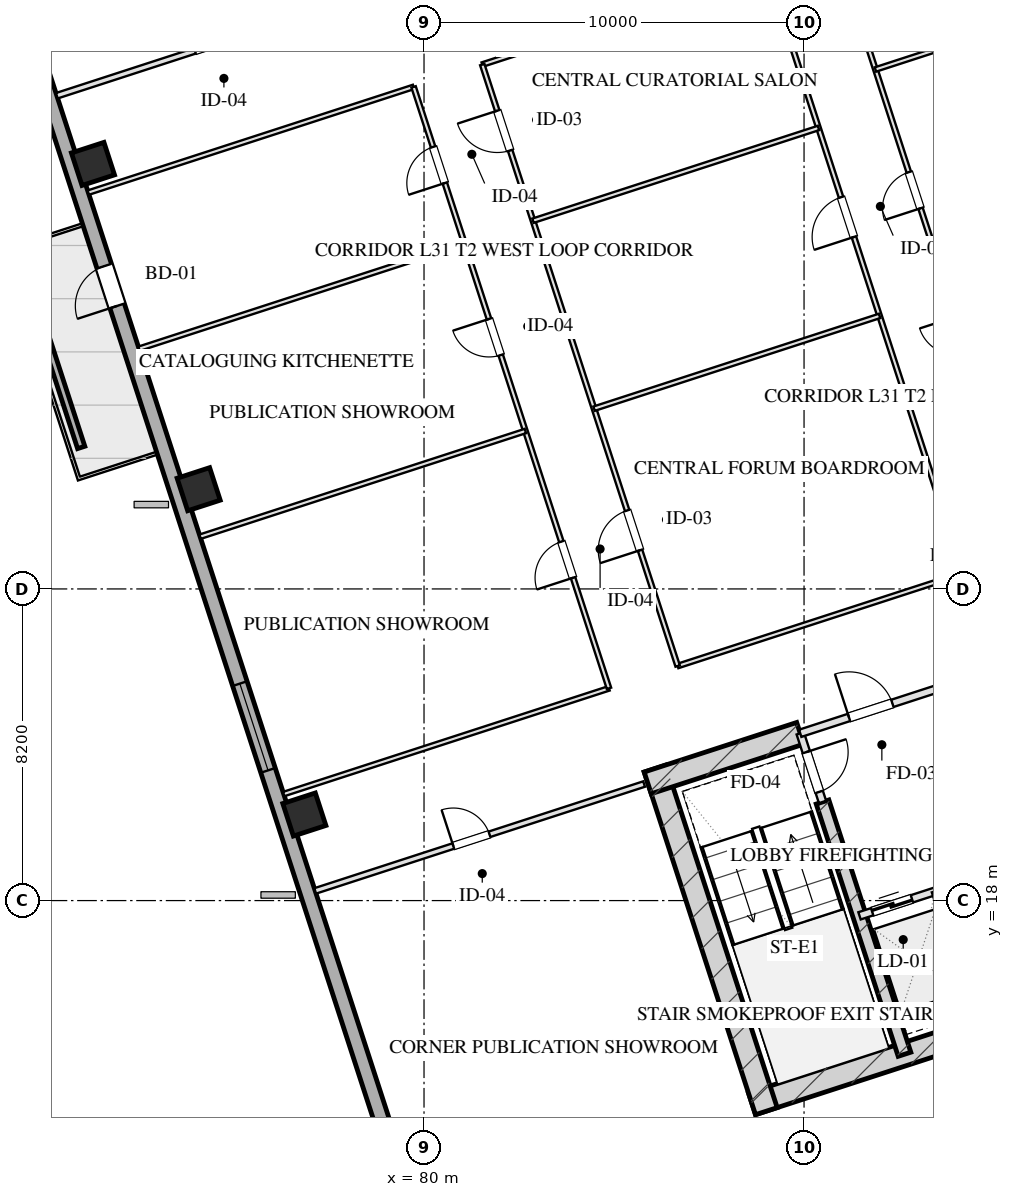
"""IFC4 building model, lengths in metres.
Left out: names, types, materials, properties, quantities, classifications, styles, units other than length and angle.
Written with IfcOpenShell. Run it as: python <this file> out.ifc"""

import sys

from ifc_helpers import new_model, si_unit, direction, frame, frame_2d, origin, origin_2d, place, context, subcontext, project, spatial, rectangle, hollow_rectangle, extrude, element, fill, save


model = new_model("IFC4")
c1 = context("Model", 3, precision=1e-05, world=origin(), true_north=direction((0.0, 1.0)))
c2 = subcontext(c1, "Body", "Model", "MODEL_VIEW")
j1 = project(units=[si_unit("LENGTHUNIT", "METRE"), si_unit("PLANEANGLEUNIT", "RADIAN")], contexts=[c1])
p1 = place(None, origin())
s1 = spatial("IfcSite", under=j1, at=p1, CompositionType="ELEMENT")
p2 = place(p1, origin())
s2 = spatial("IfcBuilding", under=s1, at=p2, CompositionType="ELEMENT")
p3 = place(p2, frame((0.0, 0.0, 120.75)))
s3 = spatial("IfcBuildingStorey", under=s2, at=p3, CompositionType="ELEMENT", Elevation=120.75)
p4 = place(p3, frame((88.63, 12.652, 0.0), z_axis=(0.0, 0.0, 1.0), x_axis=(0.95105714907, 0.309015046886, 0.0)))
e1 = element("IfcWall", 1, at=p4, inside=s3, PredefinedType="SHEAR", context=c2, shape_type="SweptSolid", body=[
    extrude(rectangle(XDim=16.4, YDim=0.6, at=frame_2d((8.2, 0.0))), origin(), (0.0, 0.0, 1.0), 3.45),
])
p5 = place(p3, frame((86.078, 21.475, 0.0), z_axis=(0.0, 0.0, 1.0), x_axis=(0.309017938678, -0.951056209472, 0.0)))
e2 = element("IfcWall", 2, at=p5, inside=s3, PredefinedType="SHEAR", context=c2, shape_type="SweptSolid", body=[
    extrude(rectangle(XDim=9.48, YDim=0.6, at=frame_2d((4.74, 0.0))), origin(), (0.0, 0.0, 1.0), 3.45),
])
p6 = place(p3, frame((90.486, 20.594, 0.0), z_axis=(0.0, 0.0, 1.0), x_axis=(0.309020428229, -0.951055400562, 0.0)))
e3 = element("IfcWall", 3, at=p6, inside=s3, PredefinedType="SHEAR", context=c2, shape_type="SweptSolid", body=[
    extrude(rectangle(XDim=6.98, YDim=0.35, at=frame_2d((3.49, 0.0))), origin(), (0.0, 0.0, 1.0), 3.45),
])
p7 = place(p3, frame((85.886, 21.097, 0.0), z_axis=(0.0, 0.0, 1.0), x_axis=(0.951068073652, 0.308981422225, 0.0)))
e4 = element("IfcWall", 4, at=p7, inside=s3, PredefinedType="SHEAR", context=c2, shape_type="SweptSolid", body=[
    extrude(rectangle(XDim=4.22, YDim=0.6, at=frame_2d((2.11, 0.0))), origin(), (0.0, 0.0, 1.0), 3.45),
])
for number, where, z_axis, x_axis in (
    (5, (76.851, 20.264, 0.0), (0.0, 0.0, 1.0), (0.951, 0.309, 0.0)),
    (6, (74.07, 28.824, 0.0), (0.0, 0.0, 1.0), (0.951, 0.309, 0.0)),
    (7, (71.289, 37.384, 0.0), (0.0, 0.0, 1.0), (0.951, 0.309, 0.0)),
):
    element("IfcColumn", number, at=place(p3, frame(where, z_axis=z_axis, x_axis=x_axis)), inside=s3, PredefinedType="COLUMN", context=c2, shape_type="SweptSolid", body=[
        extrude(hollow_rectangle(XDim=0.9, YDim=0.9, WallThickness=0.032, at=origin_2d()), origin(), (0.0, 0.0, 1.0), 3.451),
    ])
p8 = place(p3, frame((80.716, 6.59, 0.0), z_axis=(0.0, 0.0, 1.0), x_axis=(-0.309017542002, 0.95105633836, 0.0)))
e8 = element("IfcWall", 8, at=p8, inside=s3, PredefinedType="SOLIDWALL", context=c2, shape_type="SweptSolid", body=[
    extrude(rectangle(XDim=46.4, YDim=0.4, at=frame_2d((23.2, 0.0))), origin(), (0.0, 0.0, 1.0), 2.61),
])
p9 = place(p8, frame((15.6, 0.0, 0.75)))
e9 = element("IfcOpeningElement", 9, at=p9, cuts=e8, PredefinedType="OPENING", context=c2, shape_type="SweptSolid", body=[
    extrude(rectangle(XDim=2.4, YDim=1.46, at=frame_2d((1.2, 0.73))), frame((0.0, 0.21, 0.0), z_axis=(0.0, -1.0, 0.0), x_axis=(1.0, 0.0, 0.0)), (0.0, 0.0, 1.0), 0.42),
])
p10 = place(p8, frame((28.45, 0.0, 0.0)))
e10 = element("IfcOpeningElement", 10, at=p10, cuts=e8, PredefinedType="OPENING", context=c2, shape_type="SweptSolid", body=[
    extrude(rectangle(XDim=1.1, YDim=2.15, at=frame_2d((0.55, 1.075))), frame((0.0, 0.21, 0.0), z_axis=(0.0, -1.0, 0.0), x_axis=(1.0, 0.0, 0.0)), (0.0, 0.0, 1.0), 0.42),
])
p11 = place(p3, frame((111.953, 14.005, 0.0), z_axis=(0.0, 0.0, 1.0), x_axis=(-0.95105505922, -0.309021478754, 0.0)))
e11 = element("IfcWall", 11, at=p11, inside=s3, PredefinedType="SOLIDWALL", context=c2, shape_type="SweptSolid", body=[
    extrude(rectangle(XDim=29.4, YDim=0.4, at=frame_2d((14.7, 0.0))), origin(), (0.0, 0.0, 1.0), 2.61),
])
p12 = place(p3, frame((70.979, 29.923, 0.0), z_axis=(0.0, 0.0, 1.0), x_axis=(-0.308986014439, 0.951066581729, 0.0)))
e12 = element("IfcWall", 12, at=p12, inside=s3, PredefinedType="PARAPET", context=c2, shape_type="SweptSolid", body=[
    extrude(rectangle(XDim=4.8, YDim=0.2, at=frame_2d((2.4, 0.0))), origin(), (0.0, 0.0, 1.0), 0.75),
])
p13 = place(p3, frame((89.899, 22.401, 0.0), z_axis=(0.0, 0.0, 1.0), x_axis=(0.308932062672, -0.951084108086, 0.0)))
e13 = element("IfcWall", 13, at=p13, inside=s3, PredefinedType="PARTITIONING", context=c2, shape_type="SweptSolid", body=[
    extrude(rectangle(XDim=1.9, YDim=0.2, at=frame_2d((0.95, 0.0))), origin(), (0.0, 0.0, 1.0), 3.175),
])
p14 = place(p13, frame((0.52, 0.0, 0.0)))
e14 = element("IfcOpeningElement", 14, at=p14, cuts=e13, PredefinedType="OPENING", context=c2, shape_type="SweptSolid", body=[
    extrude(rectangle(XDim=1.1, YDim=2.05, at=frame_2d((0.55, 1.025))), frame((0.0, 0.11, 0.0), z_axis=(0.0, -1.0, 0.0), x_axis=(1.0, 0.0, 0.0)), (0.0, 0.0, 1.0), 0.22),
])
p15 = place(p3, frame((89.899, 22.401, 0.0), z_axis=(0.0, 0.0, 1.0), x_axis=(0.951046716504, 0.309047153403, 0.0)))
e15 = element("IfcWall", 15, at=p15, inside=s3, PredefinedType="PARTITIONING", context=c2, shape_type="SweptSolid", body=[
    extrude(rectangle(XDim=3.83, YDim=0.2, at=frame_2d((1.915, 0.0))), origin(), (0.0, 0.0, 1.0), 3.175),
])
p16 = place(p15, frame((1.35, 0.0, 0.0)))
e16 = element("IfcOpeningElement", 16, at=p16, cuts=e15, PredefinedType="OPENING", context=c2, shape_type="SweptSolid", body=[
    extrude(rectangle(XDim=1.2, YDim=2.05, at=frame_2d((0.6, 1.025))), frame((0.0, 0.11, 0.0), z_axis=(0.0, -1.0, 0.0), x_axis=(1.0, 0.0, 0.0)), (0.0, 0.0, 1.0), 0.22),
])
p17 = place(p3, frame((91.46, 17.598, 0.0), z_axis=(0.0, 0.0, 1.0), x_axis=(0.951062257173, 0.308999325213, 0.0)))
e17 = element("IfcWall", 17, at=p17, inside=s3, PredefinedType="PARTITIONING", context=c2, shape_type="SweptSolid", body=[
    extrude(rectangle(XDim=2.1, YDim=0.2, at=frame_2d((1.05, 0.0))), origin(), (0.0, 0.0, 1.0), 3.175),
])
p18 = place(p17, frame((0.35, 0.0, 0.0)))
e18 = element("IfcOpeningElement", 18, at=p18, cuts=e17, PredefinedType="OPENING", context=c2, shape_type="SweptSolid", body=[
    extrude(rectangle(XDim=1.1, YDim=2.05, at=frame_2d((0.55, 1.025))), frame((0.0, 0.11, 0.0), z_axis=(0.0, -1.0, 0.0), x_axis=(1.0, 0.0, 0.0)), (0.0, 0.0, 1.0), 0.22),
])
p19 = place(p3, frame((93.457, 18.247, 0.0), z_axis=(0.0, 0.0, 1.0), x_axis=(0.3089935693, -0.951064127245, 0.0)))
e19 = element("IfcWall", 19, at=p19, inside=s3, PredefinedType="PARTITIONING", context=c2, shape_type="SweptSolid", body=[
    extrude(rectangle(XDim=3.7, YDim=0.2, at=frame_2d((1.85, 0.0))), origin(), (0.0, 0.0, 1.0), 3.175),
])
p20 = place(p3, frame((77.136, 18.254, 0.0), z_axis=(0.0, 0.0, 1.0), x_axis=(0.951057133767, 0.309015093986, 0.0)))
e20 = element("IfcWall", 20, at=p20, inside=s3, PredefinedType="PARTITIONING", context=c2, shape_type="SweptSolid", body=[
    extrude(rectangle(XDim=9.1, YDim=0.15, at=frame_2d((4.55, 0.0))), origin(), (0.0, 0.0, 1.0), 3.175),
])
p21 = place(p20, frame((3.822, 0.0, 0.0)))
e21 = element("IfcOpeningElement", 21, at=p21, cuts=e20, PredefinedType="OPENING", context=c2, shape_type="SweptSolid", body=[
    extrude(rectangle(XDim=1.0, YDim=2.05, at=frame_2d((0.5, 1.025))), frame((0.0, 0.085, 0.0), z_axis=(0.0, -1.0, 0.0), x_axis=(1.0, 0.0, 0.0)), (0.0, 0.0, 1.0), 0.17),
])
p22 = place(p3, frame((70.338, 39.177, 0.0), z_axis=(0.0, 0.0, 1.0), x_axis=(0.951059695568, 0.309007209409, 0.0)))
e22 = element("IfcWall", 22, at=p22, inside=s3, PredefinedType="PARTITIONING", context=c2, shape_type="SweptSolid", body=[
    extrude(rectangle(XDim=9.1, YDim=0.15, at=frame_2d((4.55, 0.0))), origin(), (0.0, 0.0, 1.0), 3.175),
])
p23 = place(p22, frame((3.822, 0.0, 0.0)))
e23 = element("IfcOpeningElement", 23, at=p23, cuts=e22, PredefinedType="OPENING", context=c2, shape_type="SweptSolid", body=[
    extrude(rectangle(XDim=1.0, YDim=2.05, at=frame_2d((0.5, 1.025))), frame((0.0, 0.085, 0.0), z_axis=(0.0, -1.0, 0.0), x_axis=(1.0, 0.0, 0.0)), (0.0, 0.0, 1.0), 0.17),
])
p24 = place(p3, frame((76.308, 20.803, 0.0), z_axis=(0.0, 0.0, 1.0), x_axis=(0.951054001411, 0.309024734286, 0.0)))
e24 = element("IfcWall", 24, at=p24, inside=s3, PredefinedType="PARTITIONING", context=c2, shape_type="SweptSolid", body=[
    extrude(rectangle(XDim=9.0, YDim=0.12, at=frame_2d((4.5, 0.0))), origin(), (0.0, 0.0, 1.0), 3.175),
])
p25 = place(p3, frame((86.675, 24.171, 0.0), z_axis=(0.0, 0.0, 1.0), x_axis=(0.951057231385, 0.309014793547, 0.0)))
e25 = element("IfcWall", 25, at=p25, inside=s3, PredefinedType="PARTITIONING", context=c2, shape_type="SweptSolid", body=[
    extrude(rectangle(XDim=7.9, YDim=0.12, at=frame_2d((3.95, 0.0))), origin(), (0.0, 0.0, 1.0), 3.175),
])
p26 = place(p3, frame((71.166, 36.629, 0.0), z_axis=(0.0, 0.0, 1.0), x_axis=(0.951059383421, 0.309008170129, 0.0)))
e26 = element("IfcWall", 26, at=p26, inside=s3, PredefinedType="PARTITIONING", context=c2, shape_type="SweptSolid", body=[
    extrude(rectangle(XDim=9.0, YDim=0.12, at=frame_2d((4.5, 0.0))), origin(), (0.0, 0.0, 1.0), 3.175),
])
p27 = place(p3, frame((81.532, 39.997, 0.0), z_axis=(0.0, 0.0, 1.0), x_axis=(0.951048148493, 0.309042746635, 0.0)))
e27 = element("IfcWall", 27, at=p27, inside=s3, PredefinedType="PARTITIONING", context=c2, shape_type="SweptSolid", body=[
    extrude(rectangle(XDim=7.9, YDim=0.12, at=frame_2d((3.95, 0.0))), origin(), (0.0, 0.0, 1.0), 3.175),
])
p28 = place(p3, frame((84.867, 23.584, 0.0), z_axis=(0.0, 0.0, 1.0), x_axis=(-0.309022042254, 0.951054876125, 0.0)))
e28 = element("IfcWall", 28, at=p28, inside=s3, PredefinedType="PARTITIONING", context=c2, shape_type="SweptSolid", body=[
    extrude(rectangle(XDim=16.64, YDim=0.12, at=frame_2d((8.32, 0.0))), origin(), (0.0, 0.0, 1.0), 3.175),
])
p29 = place(p28, frame((3.06, 0.0, 0.0)))
e29 = element("IfcOpeningElement", 29, at=p29, cuts=e28, PredefinedType="OPENING", context=c2, shape_type="SweptSolid", body=[
    extrude(rectangle(XDim=1.0, YDim=2.05, at=frame_2d((0.5, 1.025))), frame((0.0, 0.07, 0.0), z_axis=(0.0, -1.0, 0.0), x_axis=(1.0, 0.0, 0.0)), (0.0, 0.0, 1.0), 0.14),
])
p30 = place(p28, frame((9.22, 0.0, 0.0)))
e30 = element("IfcOpeningElement", 30, at=p30, cuts=e28, PredefinedType="OPENING", context=c2, shape_type="SweptSolid", body=[
    extrude(rectangle(XDim=1.0, YDim=2.05, at=frame_2d((0.5, 1.025))), frame((0.0, 0.07, 0.0), z_axis=(0.0, -1.0, 0.0), x_axis=(1.0, 0.0, 0.0)), (0.0, 0.0, 1.0), 0.14),
])
p31 = place(p28, frame((13.98, 0.0, 0.0)))
e31 = element("IfcOpeningElement", 31, at=p31, cuts=e28, PredefinedType="OPENING", context=c2, shape_type="SweptSolid", body=[
    extrude(rectangle(XDim=1.0, YDim=2.05, at=frame_2d((0.5, 1.025))), frame((0.0, 0.07, 0.0), z_axis=(0.0, -1.0, 0.0), x_axis=(1.0, 0.0, 0.0)), (0.0, 0.0, 1.0), 0.14),
])
p32 = place(p3, frame((86.675, 24.171, 0.0), z_axis=(0.0, 0.0, 1.0), x_axis=(-0.309022042254, 0.951054876125, 0.0)))
e32 = element("IfcWall", 32, at=p32, inside=s3, PredefinedType="PARTITIONING", context=c2, shape_type="SweptSolid", body=[
    extrude(rectangle(XDim=16.64, YDim=0.12, at=frame_2d((8.32, 0.0))), origin(), (0.0, 0.0, 1.0), 3.175),
])
p33 = place(p32, frame((3.204, 0.0, 0.0)))
e33 = element("IfcOpeningElement", 33, at=p33, cuts=e32, PredefinedType="OPENING", context=c2, shape_type="SweptSolid", body=[
    extrude(rectangle(XDim=1.1, YDim=2.05, at=frame_2d((0.55, 1.025))), frame((0.0, 0.07, 0.0), z_axis=(0.0, -1.0, 0.0), x_axis=(1.0, 0.0, 0.0)), (0.0, 0.0, 1.0), 0.14),
])
p34 = place(p32, frame((14.264, 0.0, 0.0)))
e34 = element("IfcOpeningElement", 34, at=p34, cuts=e32, PredefinedType="OPENING", context=c2, shape_type="SweptSolid", body=[
    extrude(rectangle(XDim=1.1, YDim=2.05, at=frame_2d((0.55, 1.025))), frame((0.0, 0.07, 0.0), z_axis=(0.0, -1.0, 0.0), x_axis=(1.0, 0.0, 0.0)), (0.0, 0.0, 1.0), 0.14),
])
p35 = place(p3, frame((94.188, 26.613, 0.0), z_axis=(0.0, 0.0, 1.0), x_axis=(-0.30901773025, 0.951056277195, 0.0)))
e35 = element("IfcWall", 35, at=p35, inside=s3, PredefinedType="PARTITIONING", context=c2, shape_type="SweptSolid", body=[
    extrude(rectangle(XDim=16.64, YDim=0.12, at=frame_2d((8.32, 0.0))), origin(), (0.0, 0.0, 1.0), 3.175),
])
p36 = place(p35, frame((9.304, 0.0, 0.0)))
e36 = element("IfcOpeningElement", 36, at=p36, cuts=e35, PredefinedType="OPENING", context=c2, shape_type="SweptSolid", body=[
    extrude(rectangle(XDim=1.1, YDim=2.05, at=frame_2d((0.55, 1.025))), frame((0.0, 0.07, 0.0), z_axis=(0.0, -1.0, 0.0), x_axis=(1.0, 0.0, 0.0)), (0.0, 0.0, 1.0), 0.14),
])
p37 = place(p3, frame((95.995, 27.2, 0.0), z_axis=(0.0, 0.0, 1.0), x_axis=(-0.309022042254, 0.951054876125, 0.0)))
e37 = element("IfcWall", 37, at=p37, inside=s3, PredefinedType="PARTITIONING", context=c2, shape_type="SweptSolid", body=[
    extrude(rectangle(XDim=16.64, YDim=0.12, at=frame_2d((8.32, 0.0))), origin(), (0.0, 0.0, 1.0), 3.175),
])
p38 = place(p37, frame((1.16, 0.0, 0.0)))
e38 = element("IfcOpeningElement", 38, at=p38, cuts=e37, PredefinedType="OPENING", context=c2, shape_type="SweptSolid", body=[
    extrude(rectangle(XDim=1.0, YDim=2.05, at=frame_2d((0.5, 1.025))), frame((0.0, 0.07, 0.0), z_axis=(0.0, -1.0, 0.0), x_axis=(1.0, 0.0, 0.0)), (0.0, 0.0, 1.0), 0.14),
])
p39 = place(p37, frame((5.48, 0.0, 0.0)))
e39 = element("IfcOpeningElement", 39, at=p39, cuts=e37, PredefinedType="OPENING", context=c2, shape_type="SweptSolid", body=[
    extrude(rectangle(XDim=1.0, YDim=2.05, at=frame_2d((0.5, 1.025))), frame((0.0, 0.07, 0.0), z_axis=(0.0, -1.0, 0.0), x_axis=(1.0, 0.0, 0.0)), (0.0, 0.0, 1.0), 0.14),
])
p40 = place(p37, frame((9.48, 0.0, 0.0)))
e40 = element("IfcOpeningElement", 40, at=p40, cuts=e37, PredefinedType="OPENING", context=c2, shape_type="SweptSolid", body=[
    extrude(rectangle(XDim=1.0, YDim=2.05, at=frame_2d((0.5, 1.025))), frame((0.0, 0.07, 0.0), z_axis=(0.0, -1.0, 0.0), x_axis=(1.0, 0.0, 0.0)), (0.0, 0.0, 1.0), 0.14),
])
p41 = place(p37, frame((14.48, 0.0, 0.0)))
e41 = element("IfcOpeningElement", 41, at=p41, cuts=e37, PredefinedType="OPENING", context=c2, shape_type="SweptSolid", body=[
    extrude(rectangle(XDim=1.0, YDim=2.05, at=frame_2d((0.5, 1.025))), frame((0.0, 0.07, 0.0), z_axis=(0.0, -1.0, 0.0), x_axis=(1.0, 0.0, 0.0)), (0.0, 0.0, 1.0), 0.14),
])
for number, where, z_axis, x_axis in (
    (42, (84.474, 30.943, 0.0), (0.0, 0.0, 1.0), (0.951, 0.309, 0.0)),
    (43, (82.867, 35.888, 0.0), (0.0, 0.0, 1.0), (0.951, 0.309, 0.0)),
):
    element("IfcWall", number, at=place(p3, frame(where, z_axis=z_axis, x_axis=x_axis)), inside=s3, PredefinedType="PARTITIONING", context=c2, shape_type="SweptSolid", body=[
        extrude(rectangle(XDim=7.9, YDim=0.12, at=frame_2d((3.95, 0.0))), origin(), (0.0, 0.0, 1.0), 3.175),
    ])
p42 = place(p3, frame((74.108, 27.574, 0.0), z_axis=(0.0, 0.0, 1.0), x_axis=(0.951054001411, 0.309024734286, 0.0)))
e44 = element("IfcWall", 44, at=p42, inside=s3, PredefinedType="PARTITIONING", context=c2, shape_type="SweptSolid", body=[
    extrude(rectangle(XDim=9.0, YDim=0.12, at=frame_2d((4.5, 0.0))), origin(), (0.0, 0.0, 1.0), 3.175),
])
p43 = place(p3, frame((72.501, 32.52, 0.0), z_axis=(0.0, 0.0, 1.0), x_axis=(0.951051410833, 0.309032706929, 0.0)))
e45 = element("IfcWall", 45, at=p43, inside=s3, PredefinedType="PARTITIONING", context=c2, shape_type="SweptSolid", body=[
    extrude(rectangle(XDim=9.0, YDim=0.12, at=frame_2d((4.5, 0.0))), origin(), (0.0, 0.0, 1.0), 3.175),
])
p44 = place(p3, frame((91.879, 39.868, 0.0), z_axis=(0.0, 0.0, 1.0), x_axis=(0.951054001411, 0.309024734286, 0.0)))
e46 = element("IfcWall", 46, at=p44, inside=s3, PredefinedType="PARTITIONING", context=c2, shape_type="SweptSolid", body=[
    extrude(rectangle(XDim=13.5, YDim=0.12, at=frame_2d((6.75, 0.0))), origin(), (0.0, 0.0, 1.0), 3.175),
])
p45 = place(p9, origin())
e47 = element("IfcWindow", 47, at=p45, inside=s3, PartitioningType="TRIPLE_PANEL_VERTICAL", PredefinedType="WINDOW", context=c2, shape_type="SweptSolid", body=[
    extrude(rectangle(XDim=2.4, YDim=1.46, at=frame_2d((1.2, 0.73))), frame((0.0, 0.03, 0.0), z_axis=(0.0, -1.0, 0.0), x_axis=(1.0, 0.0, 0.0)), (0.0, 0.0, 1.0), 0.06),
])
fill(e9, e47)
p46 = place(p10, origin())
e48 = element("IfcDoor", 48, at=p46, inside=s3, OperationType="SINGLE_SWING_LEFT", PredefinedType="DOOR", context=c2, shape_type="SweptSolid", body=[
    extrude(rectangle(XDim=1.1, YDim=2.15, at=frame_2d((0.55, 1.075))), frame((0.0, 0.025, 0.0), z_axis=(0.0, -1.0, 0.0), x_axis=(1.0, 0.0, 0.0)), (0.0, 0.0, 1.0), 0.05),
])
fill(e10, e48)
p47 = place(p14, origin())
e49 = element("IfcDoor", 49, at=p47, inside=s3, OperationType="SINGLE_SWING_LEFT", PredefinedType="DOOR", context=c2, shape_type="SweptSolid", body=[
    extrude(rectangle(XDim=1.1, YDim=2.05, at=frame_2d((0.55, 1.025))), frame((0.0, 0.025, 0.0), z_axis=(0.0, -1.0, 0.0), x_axis=(1.0, 0.0, 0.0)), (0.0, 0.0, 1.0), 0.05),
])
fill(e14, e49)
p48 = place(p16, origin())
e50 = element("IfcDoor", 50, at=p48, inside=s3, OperationType="SINGLE_SWING_LEFT", PredefinedType="DOOR", context=c2, shape_type="SweptSolid", body=[
    extrude(rectangle(XDim=1.2, YDim=2.05, at=frame_2d((0.6, 1.025))), frame((0.0, 0.025, 0.0), z_axis=(0.0, -1.0, 0.0), x_axis=(1.0, 0.0, 0.0)), (0.0, 0.0, 1.0), 0.05),
])
fill(e16, e50)
p49 = place(p18, origin())
e51 = element("IfcDoor", 51, at=p49, inside=s3, OperationType="DOUBLE_DOOR_SLIDING", PredefinedType="DOOR", context=c2, shape_type="SweptSolid", body=[
    extrude(rectangle(XDim=1.1, YDim=2.05, at=frame_2d((0.55, 1.025))), frame((0.0, 0.025, 0.0), z_axis=(0.0, -1.0, 0.0), x_axis=(1.0, 0.0, 0.0)), (0.0, 0.0, 1.0), 0.05),
])
fill(e18, e51)
p50 = place(p21, origin())
e52 = element("IfcDoor", 52, at=p50, inside=s3, OperationType="SINGLE_SWING_LEFT", PredefinedType="DOOR", context=c2, shape_type="SweptSolid", body=[
    extrude(rectangle(XDim=1.0, YDim=2.05, at=frame_2d((0.5, 1.025))), frame((0.0, 0.025, 0.0), z_axis=(0.0, -1.0, 0.0), x_axis=(1.0, 0.0, 0.0)), (0.0, 0.0, 1.0), 0.05),
])
fill(e21, e52)
p51 = place(p29, origin())
e53 = element("IfcDoor", 53, at=p51, inside=s3, OperationType="SINGLE_SWING_LEFT", PredefinedType="DOOR", context=c2, shape_type="SweptSolid", body=[
    extrude(rectangle(XDim=1.0, YDim=2.05, at=frame_2d((0.5, 1.025))), frame((0.0, 0.025, 0.0), z_axis=(0.0, -1.0, 0.0), x_axis=(1.0, 0.0, 0.0)), (0.0, 0.0, 1.0), 0.05),
])
fill(e29, e53)
p52 = place(p30, origin())
e54 = element("IfcDoor", 54, at=p52, inside=s3, OperationType="SINGLE_SWING_RIGHT", PredefinedType="DOOR", context=c2, shape_type="SweptSolid", body=[
    extrude(rectangle(XDim=1.0, YDim=2.05, at=frame_2d((0.5, 1.025))), frame((0.0, 0.025, 0.0), z_axis=(0.0, -1.0, 0.0), x_axis=(1.0, 0.0, 0.0)), (0.0, 0.0, 1.0), 0.05),
])
fill(e30, e54)
p53 = place(p31, origin())
e55 = element("IfcDoor", 55, at=p53, inside=s3, OperationType="SINGLE_SWING_LEFT", PredefinedType="DOOR", context=c2, shape_type="SweptSolid", body=[
    extrude(rectangle(XDim=1.0, YDim=2.05, at=frame_2d((0.5, 1.025))), frame((0.0, 0.025, 0.0), z_axis=(0.0, -1.0, 0.0), x_axis=(1.0, 0.0, 0.0)), (0.0, 0.0, 1.0), 0.05),
])
fill(e31, e55)
p54 = place(p33, origin())
e56 = element("IfcDoor", 56, at=p54, inside=s3, OperationType="SINGLE_SWING_LEFT", PredefinedType="DOOR", context=c2, shape_type="SweptSolid", body=[
    extrude(rectangle(XDim=1.1, YDim=2.05, at=frame_2d((0.55, 1.025))), frame((0.0, 0.025, 0.0), z_axis=(0.0, -1.0, 0.0), x_axis=(1.0, 0.0, 0.0)), (0.0, 0.0, 1.0), 0.05),
])
fill(e33, e56)
p55 = place(p34, origin())
e57 = element("IfcDoor", 57, at=p55, inside=s3, OperationType="SINGLE_SWING_RIGHT", PredefinedType="DOOR", context=c2, shape_type="SweptSolid", body=[
    extrude(rectangle(XDim=1.1, YDim=2.05, at=frame_2d((0.55, 1.025))), frame((0.0, 0.025, 0.0), z_axis=(0.0, -1.0, 0.0), x_axis=(1.0, 0.0, 0.0)), (0.0, 0.0, 1.0), 0.05),
])
fill(e34, e57)
p56 = place(p36, origin())
e58 = element("IfcDoor", 58, at=p56, inside=s3, OperationType="SINGLE_SWING_LEFT", PredefinedType="DOOR", context=c2, shape_type="SweptSolid", body=[
    extrude(rectangle(XDim=1.1, YDim=2.05, at=frame_2d((0.55, 1.025))), frame((0.0, 0.025, 0.0), z_axis=(0.0, -1.0, 0.0), x_axis=(1.0, 0.0, 0.0)), (0.0, 0.0, 1.0), 0.05),
])
fill(e36, e58)
p57 = place(p40, origin())
e59 = element("IfcDoor", 59, at=p57, inside=s3, OperationType="SINGLE_SWING_LEFT", PredefinedType="DOOR", context=c2, shape_type="SweptSolid", body=[
    extrude(rectangle(XDim=1.0, YDim=2.05, at=frame_2d((0.5, 1.025))), frame((0.0, 0.025, 0.0), z_axis=(0.0, -1.0, 0.0), x_axis=(1.0, 0.0, 0.0)), (0.0, 0.0, 1.0), 0.05),
])
fill(e40, e59)
save(model, sys.argv[1])
